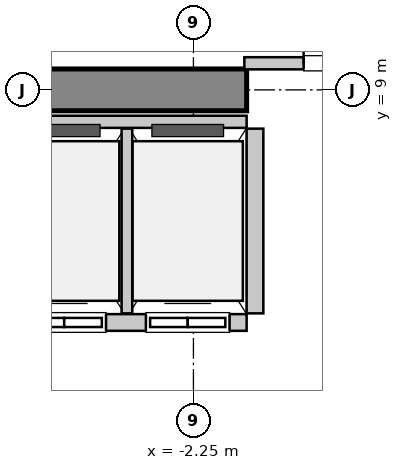
"""IFC4 building model, lengths in metres.
Left out: names, types, materials, properties, quantities, classifications, styles, units other than length and angle.
Written with IfcOpenShell. Run it as: python <this file> out.ifc"""

import sys

from ifc_helpers import new_model, si_unit, direction, frame, frame_2d, origin, place, context, subcontext, project, spatial, rectangle, extrude, source, transform, mapped, element, fill, save


model = new_model("IFC4")
c1 = context("Model", 3, precision=1e-05, world=origin(), true_north=direction((0.0, 1.0)))
c2 = subcontext(c1, "Body", "Model", "MODEL_VIEW")
j1 = project(units=[si_unit("LENGTHUNIT", "METRE"), si_unit("PLANEANGLEUNIT", "RADIAN")], contexts=[c1])
p1 = place(None, origin())
s1 = spatial("IfcSite", under=j1, at=p1, CompositionType="ELEMENT")
p2 = place(p1, origin())
s2 = spatial("IfcBuilding", under=s1, at=p2, CompositionType="ELEMENT")
p3 = place(p2, frame((0.0, 0.0, 90.8)))
s3 = spatial("IfcBuildingStorey", under=s2, at=p3, CompositionType="ELEMENT", Elevation=90.8)
m1 = source(origin(), c2, "Body", "SweptSolid", [
    extrude(rectangle(XDim=9.975, YDim=0.55, at=frame_2d((4.987, 0.0))), origin(), (0.0, 0.0, 1.0), 3.8),
])
p4 = place(p3, frame((-11.525, 9.0, 0.0), z_axis=(0.0, 0.0, 1.0), x_axis=(1.0, 0.0, 0.0)))
e1 = element("IfcWall", 1, at=p4, inside=s3, PredefinedType="SHEAR", context=c2, shape_type="MappedRepresentation", body=[
    mapped(m1, transform((0.0, 0.0, 0.0), x_axis=(1.0, 0.0, 0.0), y_axis=(0.0, 1.0, 0.0), z_axis=(0.0, 0.0, 1.0), scale=1.0)),
])
m2 = source(origin(), c2, "Body", "SweptSolid", [
    extrude(rectangle(XDim=3.2, YDim=0.22, at=frame_2d((1.6, 0.0))), origin(), (0.0, 0.0, 1.0), 3.535),
])
p5 = place(p3, frame((-4.75, 5.94, 0.0), z_axis=(0.0, 0.0, 1.0), x_axis=(1.0, 0.0, 0.0)))
e2 = element("IfcWall", 2, at=p5, inside=s3, PredefinedType="SOLIDWALL", context=c2, shape_type="MappedRepresentation", body=[
    mapped(m2, transform((0.0, 0.0, 0.0), x_axis=(1.0, 0.0, 0.0), y_axis=(0.0, 1.0, 0.0), z_axis=(0.0, 0.0, 1.0), scale=1.0)),
])
p6 = place(p5, frame((0.25, 0.0, 0.0)))
e3 = element("IfcOpeningElement", 3, at=p6, cuts=e2, PredefinedType="OPENING", context=c2, shape_type="SweptSolid", body=[
    extrude(rectangle(XDim=1.1, YDim=2.2, at=frame_2d((0.55, 1.1))), frame((0.0, 0.12, 0.0), z_axis=(0.0, -1.0, 0.0), x_axis=(1.0, 0.0, 0.0)), (0.0, 0.0, 1.0), 0.24),
])
p7 = place(p5, frame((1.875, 0.0, 0.0)))
e4 = element("IfcOpeningElement", 4, at=p7, cuts=e2, PredefinedType="OPENING", context=c2, shape_type="SweptSolid", body=[
    extrude(rectangle(XDim=1.1, YDim=2.2, at=frame_2d((0.55, 1.1))), frame((0.0, 0.12, 0.0), z_axis=(0.0, -1.0, 0.0), x_axis=(1.0, 0.0, 0.0)), (0.0, 0.0, 1.0), 0.24),
])
m3 = source(origin(), c2, "Body", "SweptSolid", [
    extrude(rectangle(XDim=3.2, YDim=0.16, at=frame_2d((1.6, 0.0))), origin(), (0.0, 0.0, 1.0), 2.425),
])
p8 = place(p3, frame((-1.55, 8.58, 0.0), z_axis=(0.0, 0.0, 1.0), x_axis=(-1.0, 0.0, 0.0)))
e5 = element("IfcWall", 5, at=p8, inside=s3, PredefinedType="PARTITIONING", context=c2, shape_type="MappedRepresentation", body=[
    mapped(m3, transform((0.0, 0.0, 0.0), x_axis=(1.0, 0.0, 0.0), y_axis=(0.0, 1.0, 0.0), z_axis=(0.0, 0.0, 1.0), scale=1.0)),
])
m4 = source(origin(), c2, "Body", "SweptSolid", [
    extrude(rectangle(XDim=2.43, YDim=0.14, at=frame_2d((1.215, 0.0))), origin(), (0.0, 0.0, 1.0), 3.535),
])
p9 = place(p3, frame((-3.125, 6.06, 0.0), z_axis=(0.0, 0.0, 1.0), x_axis=(0.0, 1.0, 0.0)))
e6 = element("IfcWall", 6, at=p9, inside=s3, PredefinedType="PARTITIONING", context=c2, shape_type="MappedRepresentation", body=[
    mapped(m4, transform((0.0, 0.0, 0.0), x_axis=(1.0, 0.0, 0.0), y_axis=(0.0, 1.0, 0.0), z_axis=(0.0, 0.0, 1.0), scale=1.0)),
])
m5 = source(origin(), c2, "Body", "SweptSolid", [
    extrude(rectangle(XDim=2.43, YDim=0.22, at=frame_2d((1.215, 0.0))), origin(), (0.0, 0.0, 1.0), 3.535),
])
p10 = place(p3, frame((-1.44, 6.06, 0.0), z_axis=(0.0, 0.0, 1.0), x_axis=(0.0, 1.0, 0.0)))
e7 = element("IfcWall", 7, at=p10, inside=s3, PredefinedType="SOLIDWALL", context=c2, shape_type="MappedRepresentation", body=[
    mapped(m5, transform((0.0, 0.0, 0.0), x_axis=(1.0, 0.0, 0.0), y_axis=(0.0, 1.0, 0.0), z_axis=(0.0, 0.0, 1.0), scale=1.0)),
])
m6 = source(origin(), c2, "Body", "SweptSolid", [
    extrude(rectangle(XDim=3.16, YDim=0.16, at=frame_2d((1.58, 0.0))), origin(), (0.0, 0.0, 1.0), 2.425),
])
p11 = place(p3, frame((-1.58, 9.35, 0.0), z_axis=(0.0, 0.0, 1.0), x_axis=(1.0, 0.0, 0.0)))
e8 = element("IfcWall", 8, at=p11, inside=s3, PredefinedType="PARTITIONING", context=c2, shape_type="MappedRepresentation", body=[
    mapped(m6, transform((0.0, 0.0, 0.0), x_axis=(1.0, 0.0, 0.0), y_axis=(0.0, 1.0, 0.0), z_axis=(0.0, 0.0, 1.0), scale=1.0)),
])
p12 = place(p11, frame((0.78, 0.0, 0.0)))
e9 = element("IfcOpeningElement", 9, at=p12, cuts=e8, PredefinedType="OPENING", context=c2, shape_type="SweptSolid", body=[
    extrude(rectangle(XDim=1.6, YDim=2.3, at=frame_2d((0.8, 1.15))), frame((0.0, 0.09, 0.0), z_axis=(0.0, -1.0, 0.0), x_axis=(1.0, 0.0, 0.0)), (0.0, 0.0, 1.0), 0.18),
])
m7 = source(origin(), c2, "Body", "SweptSolid", [
    extrude(rectangle(XDim=1.1, YDim=2.2, at=frame_2d((0.55, 1.1))), frame((0.0, 0.025, 0.0), z_axis=(0.0, -1.0, 0.0), x_axis=(1.0, 0.0, 0.0)), (0.0, 0.0, 1.0), 0.05),
])
p13 = place(p6, origin())
e10 = element("IfcDoor", 10, at=p13, inside=s3, OperationType="DOUBLE_DOOR_SLIDING", PredefinedType="DOOR", context=c2, shape_type="MappedRepresentation", body=[
    mapped(m7, transform((0.0, 0.0, 0.0), x_axis=(1.0, 0.0, 0.0), y_axis=(0.0, 1.0, 0.0), z_axis=(0.0, 0.0, 1.0), scale=1.0)),
])
fill(e3, e10)
p14 = place(p7, origin())
e11 = element("IfcDoor", 11, at=p14, inside=s3, OperationType="DOUBLE_DOOR_SLIDING", PredefinedType="DOOR", context=c2, shape_type="MappedRepresentation", body=[
    mapped(m7, transform((0.0, 0.0, 0.0), x_axis=(1.0, 0.0, 0.0), y_axis=(0.0, 1.0, 0.0), z_axis=(0.0, 0.0, 1.0), scale=1.0)),
])
fill(e4, e11)
m8 = source(origin(), c2, "Body", "SweptSolid", [
    extrude(rectangle(XDim=1.6, YDim=2.3, at=frame_2d((0.8, 1.15))), frame((0.0, 0.025, 0.0), z_axis=(0.0, -1.0, 0.0), x_axis=(1.0, 0.0, 0.0)), (0.0, 0.0, 1.0), 0.05),
])
p15 = place(p12, origin())
e12 = element("IfcDoor", 12, at=p15, inside=s3, OperationType="DOUBLE_DOOR_SINGLE_SWING", PredefinedType="DOOR", context=c2, shape_type="MappedRepresentation", body=[
    mapped(m8, transform((0.0, 0.0, 0.0), x_axis=(1.0, 0.0, 0.0), y_axis=(0.0, 1.0, 0.0), z_axis=(0.0, 0.0, 1.0), scale=1.0)),
])
fill(e9, e12)
save(model, sys.argv[1])
